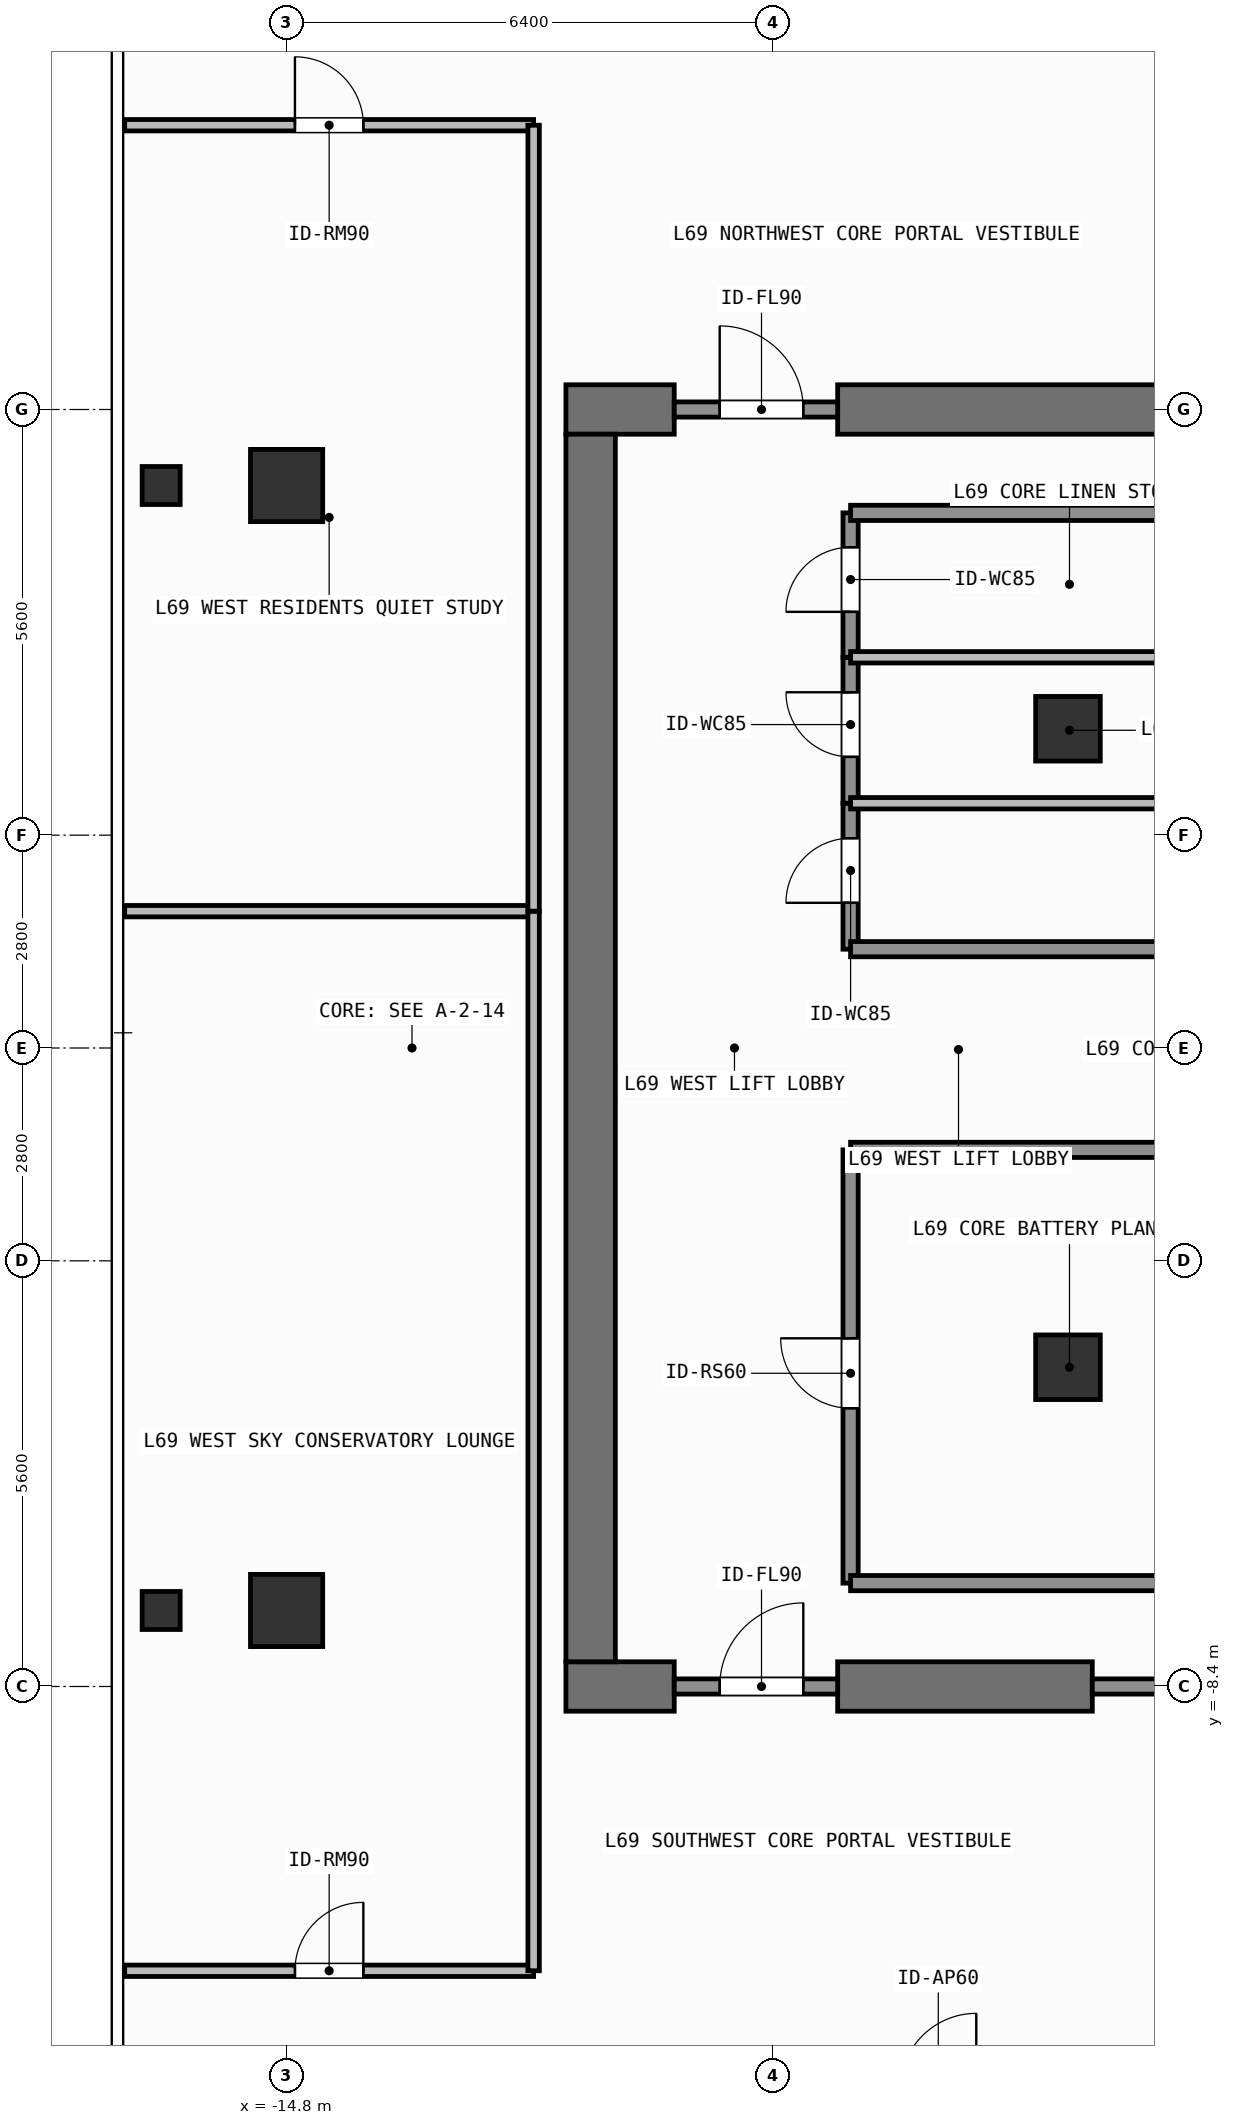
"""IFC4 building model, lengths in metres.
Left out: names, types, materials, properties, quantities, classifications, styles, units other than length and angle.
Written with IfcOpenShell. Run it as: python <this file> out.ifc"""

import sys

from ifc_helpers import new_model, si_unit, direction, frame, frame_2d, origin, origin_2d, place, context, subcontext, project, spatial, rectangle, hollow_rectangle, extrude, element, fill, save


model = new_model("IFC4")
c1 = context("Model", 3, precision=1e-05, world=origin(), true_north=direction((0.0, 1.0)))
c2 = subcontext(c1, "Body", "Model", "MODEL_VIEW")
j1 = project(units=[si_unit("LENGTHUNIT", "METRE"), si_unit("PLANEANGLEUNIT", "RADIAN")], contexts=[c1])
p1 = place(None, origin())
s1 = spatial("IfcSite", under=j1, at=p1, CompositionType="ELEMENT")
p2 = place(p1, origin())
s2 = spatial("IfcBuilding", under=s1, at=p2, CompositionType="ELEMENT")
p3 = place(p2, frame((0.0, 0.0, 282.0)))
s3 = spatial("IfcBuildingStorey", under=s2, at=p3, CompositionType="ELEMENT", Elevation=282.0)
p4 = place(p3, frame((-11.125, -8.4, 0.0), z_axis=(0.0, 0.0, 1.0), x_axis=(1.0, 0.0, 0.0)))
e1 = element("IfcWall", 1, at=p4, inside=s3, PredefinedType="SHEAR", context=c2, shape_type="SweptSolid", body=[
    extrude(rectangle(XDim=1.425, YDim=0.65, at=frame_2d((0.712, 0.0))), origin(), (0.0, 0.0, 1.0), 3.9),
])
p5 = place(p3, frame((-7.55, -8.4, 0.0), z_axis=(0.0, 0.0, 1.0), x_axis=(1.0, 0.0, 0.0)))
e2 = element("IfcWall", 2, at=p5, inside=s3, PredefinedType="SHEAR", context=c2, shape_type="SweptSolid", body=[
    extrude(rectangle(XDim=3.35, YDim=0.65, at=frame_2d((1.675, 0.0))), origin(), (0.0, 0.0, 1.0), 3.9),
])
p6 = place(p3, frame((-11.125, 8.4, 0.0), z_axis=(0.0, 0.0, 1.0), x_axis=(1.0, 0.0, 0.0)))
e3 = element("IfcWall", 3, at=p6, inside=s3, PredefinedType="SHEAR", context=c2, shape_type="SweptSolid", body=[
    extrude(rectangle(XDim=1.425, YDim=0.65, at=frame_2d((0.712, 0.0))), origin(), (0.0, 0.0, 1.0), 3.9),
])
p7 = place(p3, frame((-7.55, 8.4, 0.0), z_axis=(0.0, 0.0, 1.0), x_axis=(1.0, 0.0, 0.0)))
e4 = element("IfcWall", 4, at=p7, inside=s3, PredefinedType="SHEAR", context=c2, shape_type="SweptSolid", body=[
    extrude(rectangle(XDim=16.275, YDim=0.65, at=frame_2d((8.138, 0.0))), origin(), (0.0, 0.0, 1.0), 3.9),
])
p8 = place(p3, frame((-10.8, -8.075, 0.0), z_axis=(0.0, 0.0, 1.0), x_axis=(0.0, 1.0, 0.0)))
e5 = element("IfcWall", 5, at=p8, inside=s3, PredefinedType="SHEAR", context=c2, shape_type="SweptSolid", body=[
    extrude(rectangle(XDim=16.15, YDim=0.65, at=frame_2d((8.075, 0.0))), origin(), (0.0, 0.0, 1.0), 3.9),
])
for number, where, z_axis, x_axis in (
    (6, (-14.8, -7.4, 0.0), (0.0, 0.0, 1.0), (1.0, 0.0, 0.0)),
    (7, (-14.8, 7.4, 0.0), (0.0, 0.0, 1.0), (1.0, 0.0, 0.0)),
):
    element("IfcColumn", number, at=place(p3, frame(where, z_axis=z_axis, x_axis=x_axis)), inside=s3, PredefinedType="COLUMN", context=c2, shape_type="SweptSolid", body=[
        extrude(rectangle(XDim=0.95, YDim=0.95, at=origin_2d()), origin(), (0.0, 0.0, 1.0), 3.9),
    ])
for number, where, z_axis, x_axis in (
    (8, (-4.52, -4.2, 0.0), (0.0, 0.0, 1.0), (1.0, 0.0, 0.0)),
    (9, (-4.52, 4.2, 0.0), (0.0, 0.0, 1.0), (1.0, 0.0, 0.0)),
):
    element("IfcColumn", number, at=place(p3, frame(where, z_axis=z_axis, x_axis=x_axis)), inside=s3, PredefinedType="COLUMN", context=c2, shape_type="SweptSolid", body=[
        extrude(rectangle(XDim=0.85, YDim=0.85, at=origin_2d()), origin(), (0.0, 0.0, 1.0), 3.9),
    ])
for number, where, z_axis, x_axis in (
    (10, (-16.45, -7.4, 0.0), (0.0, 0.0, 1.0), (1.0, 0.0, 0.0)),
    (11, (-16.45, 7.4, 0.0), (0.0, 0.0, 1.0), (1.0, 0.0, 0.0)),
):
    element("IfcColumn", number, at=place(p3, frame(where, z_axis=z_axis, x_axis=x_axis)), inside=s3, PredefinedType="COLUMN", context=c2, shape_type="SweptSolid", body=[
        extrude(hollow_rectangle(XDim=0.5, YDim=0.5, WallThickness=0.025, at=origin_2d()), origin(), (0.0, 0.0, 1.0), 3.9),
    ])
p9 = place(p3, frame((-9.7, -8.4, 0.0), z_axis=(0.0, 0.0, 1.0), x_axis=(1.0, 0.0, 0.0)))
e12 = element("IfcWall", 12, at=p9, inside=s3, PredefinedType="SOLIDWALL", context=c2, shape_type="SweptSolid", body=[
    extrude(rectangle(XDim=2.15, YDim=0.2, at=frame_2d((1.075, 0.0))), origin(), (0.0, 0.0, 1.0), 2.86),
])
p10 = place(p9, frame((0.598, 0.0, 0.0)))
e13 = element("IfcOpeningElement", 13, at=p10, cuts=e12, PredefinedType="OPENING", context=c2, shape_type="SweptSolid", body=[
    extrude(rectangle(XDim=1.1, YDim=2.15, at=frame_2d((0.55, 1.075))), frame((0.0, 0.11, 0.0), z_axis=(0.0, -1.0, 0.0), x_axis=(1.0, 0.0, 0.0)), (0.0, 0.0, 1.0), 0.22),
])
p11 = place(p3, frame((-9.7, 8.4, 0.0), z_axis=(0.0, 0.0, 1.0), x_axis=(1.0, 0.0, 0.0)))
e14 = element("IfcWall", 14, at=p11, inside=s3, PredefinedType="SOLIDWALL", context=c2, shape_type="SweptSolid", body=[
    extrude(rectangle(XDim=2.15, YDim=0.2, at=frame_2d((1.075, 0.0))), origin(), (0.0, 0.0, 1.0), 2.86),
])
p12 = place(p11, frame((0.598, 0.0, 0.0)))
e15 = element("IfcOpeningElement", 15, at=p12, cuts=e14, PredefinedType="OPENING", context=c2, shape_type="SweptSolid", body=[
    extrude(rectangle(XDim=1.1, YDim=2.15, at=frame_2d((0.55, 1.075))), frame((0.0, 0.11, 0.0), z_axis=(0.0, -1.0, 0.0), x_axis=(1.0, 0.0, 0.0)), (0.0, 0.0, 1.0), 0.22),
])
p13 = place(p3, frame((-7.38, -7.04, 0.0), z_axis=(0.0, 0.0, 1.0), x_axis=(0.0, 1.0, 0.0)))
e16 = element("IfcWall", 16, at=p13, inside=s3, PredefinedType="SOLIDWALL", context=c2, shape_type="SweptSolid", body=[
    extrude(rectangle(XDim=5.7, YDim=0.2, at=frame_2d((2.85, 0.0))), origin(), (0.0, 0.0, 1.0), 3.62),
])
p14 = place(p13, frame((2.301, 0.0, 0.0)))
e17 = element("IfcOpeningElement", 17, at=p14, cuts=e16, PredefinedType="OPENING", context=c2, shape_type="SweptSolid", body=[
    extrude(rectangle(XDim=0.92, YDim=2.1, at=frame_2d((0.46, 1.05))), frame((0.0, 0.11, 0.0), z_axis=(0.0, -1.0, 0.0), x_axis=(1.0, 0.0, 0.0)), (0.0, 0.0, 1.0), 0.22),
])
p15 = place(p3, frame((-7.38, 1.3, 0.0), z_axis=(0.0, 0.0, 1.0), x_axis=(0.0, 1.0, 0.0)))
e18 = element("IfcWall", 18, at=p15, inside=s3, PredefinedType="SOLIDWALL", context=c2, shape_type="SweptSolid", body=[
    extrude(rectangle(XDim=1.92, YDim=0.2, at=frame_2d((0.96, 0.0))), origin(), (0.0, 0.0, 1.0), 3.62),
])
p16 = place(p15, frame((0.61, 0.0, 0.0)))
e19 = element("IfcOpeningElement", 19, at=p16, cuts=e18, PredefinedType="OPENING", context=c2, shape_type="SweptSolid", body=[
    extrude(rectangle(XDim=0.85, YDim=2.1, at=frame_2d((0.425, 1.05))), frame((0.0, 0.11, 0.0), z_axis=(0.0, -1.0, 0.0), x_axis=(1.0, 0.0, 0.0)), (0.0, 0.0, 1.0), 0.22),
])
p17 = place(p3, frame((-7.38, 3.22, 0.0), z_axis=(0.0, 0.0, 1.0), x_axis=(0.0, 1.0, 0.0)))
e20 = element("IfcWall", 20, at=p17, inside=s3, PredefinedType="SOLIDWALL", context=c2, shape_type="SweptSolid", body=[
    extrude(rectangle(XDim=1.92, YDim=0.2, at=frame_2d((0.96, 0.0))), origin(), (0.0, 0.0, 1.0), 3.62),
])
p18 = place(p17, frame((0.61, 0.0, 0.0)))
e21 = element("IfcOpeningElement", 21, at=p18, cuts=e20, PredefinedType="OPENING", context=c2, shape_type="SweptSolid", body=[
    extrude(rectangle(XDim=0.85, YDim=2.1, at=frame_2d((0.425, 1.05))), frame((0.0, 0.11, 0.0), z_axis=(0.0, -1.0, 0.0), x_axis=(1.0, 0.0, 0.0)), (0.0, 0.0, 1.0), 0.22),
])
p19 = place(p3, frame((-7.38, 5.14, 0.0), z_axis=(0.0, 0.0, 1.0), x_axis=(0.0, 1.0, 0.0)))
e22 = element("IfcWall", 22, at=p19, inside=s3, PredefinedType="SOLIDWALL", context=c2, shape_type="SweptSolid", body=[
    extrude(rectangle(XDim=1.9, YDim=0.2, at=frame_2d((0.95, 0.0))), origin(), (0.0, 0.0, 1.0), 3.62),
])
p20 = place(p19, frame((0.598, 0.0, 0.0)))
e23 = element("IfcOpeningElement", 23, at=p20, cuts=e22, PredefinedType="OPENING", context=c2, shape_type="SweptSolid", body=[
    extrude(rectangle(XDim=0.85, YDim=2.1, at=frame_2d((0.425, 1.05))), frame((0.0, 0.11, 0.0), z_axis=(0.0, -1.0, 0.0), x_axis=(1.0, 0.0, 0.0)), (0.0, 0.0, 1.0), 0.22),
])
p21 = place(p3, frame((-16.93, -12.14, 0.0), z_axis=(0.0, 0.0, 1.0), x_axis=(1.0, 0.0, 0.0)))
e24 = element("IfcWall", 24, at=p21, inside=s3, PredefinedType="PARTITIONING", context=c2, shape_type="SweptSolid", body=[
    extrude(rectangle(XDim=5.38, YDim=0.15, at=frame_2d((2.69, 0.0))), origin(), (0.0, 0.0, 1.0), 3.62),
])
p22 = place(p21, frame((2.24, 0.0, 0.0)))
e25 = element("IfcOpeningElement", 25, at=p22, cuts=e24, PredefinedType="OPENING", context=c2, shape_type="SweptSolid", body=[
    extrude(rectangle(XDim=0.9, YDim=2.1, at=frame_2d((0.45, 1.05))), frame((0.0, 0.085, 0.0), z_axis=(0.0, -1.0, 0.0), x_axis=(1.0, 0.0, 0.0)), (0.0, 0.0, 1.0), 0.17),
])
p23 = place(p3, frame((-16.93, 12.14, 0.0), z_axis=(0.0, 0.0, 1.0), x_axis=(1.0, 0.0, 0.0)))
e26 = element("IfcWall", 26, at=p23, inside=s3, PredefinedType="PARTITIONING", context=c2, shape_type="SweptSolid", body=[
    extrude(rectangle(XDim=5.38, YDim=0.15, at=frame_2d((2.69, 0.0))), origin(), (0.0, 0.0, 1.0), 3.62),
])
p24 = place(p23, frame((2.24, 0.0, 0.0)))
e27 = element("IfcOpeningElement", 27, at=p24, cuts=e26, PredefinedType="OPENING", context=c2, shape_type="SweptSolid", body=[
    extrude(rectangle(XDim=0.9, YDim=2.1, at=frame_2d((0.45, 1.05))), frame((0.0, 0.085, 0.0), z_axis=(0.0, -1.0, 0.0), x_axis=(1.0, 0.0, 0.0)), (0.0, 0.0, 1.0), 0.17),
])
p25 = place(p3, frame((-4.2, -8.4, 0.0), z_axis=(0.0, 0.0, 1.0), x_axis=(1.0, 0.0, 0.0)))
e28 = element("IfcWall", 28, at=p25, inside=s3, PredefinedType="SOLIDWALL", context=c2, shape_type="SweptSolid", body=[
    extrude(rectangle(XDim=1.58, YDim=0.2, at=frame_2d((0.79, 0.0))), origin(), (0.0, 0.0, 1.0), 2.86),
])
for number, where, z_axis, x_axis in (
    (29, (-7.38, -1.34, 0.0), (0.0, 0.0, 1.0), (1.0, 0.0, 0.0)),
    (30, (-7.38, 1.3, 0.0), (0.0, 0.0, 1.0), (1.0, 0.0, 0.0)),
):
    element("IfcWall", number, at=place(p3, frame(where, z_axis=z_axis, x_axis=x_axis)), inside=s3, PredefinedType="SOLIDWALL", context=c2, shape_type="SweptSolid", body=[
        extrude(rectangle(XDim=6.24, YDim=0.2, at=frame_2d((3.12, 0.0))), origin(), (0.0, 0.0, 1.0), 3.62),
    ])
for number, where, z_axis, x_axis in (
    (31, (-7.38, -7.04, 0.0), (0.0, 0.0, 1.0), (1.0, 0.0, 0.0)),
    (32, (-7.38, 7.04, 0.0), (0.0, 0.0, 1.0), (1.0, 0.0, 0.0)),
):
    element("IfcWall", number, at=place(p3, frame(where, z_axis=z_axis, x_axis=x_axis)), inside=s3, PredefinedType="SOLIDWALL", context=c2, shape_type="SweptSolid", body=[
        extrude(rectangle(XDim=5.8, YDim=0.2, at=frame_2d((2.9, 0.0))), origin(), (0.0, 0.0, 1.0), 3.62),
    ])
for number, where, z_axis, x_axis in (
    (33, (-7.38, 3.22, 0.0), (0.0, 0.0, 1.0), (1.0, 0.0, 0.0)),
    (34, (-7.38, 5.14, 0.0), (0.0, 0.0, 1.0), (1.0, 0.0, 0.0)),
):
    element("IfcWall", number, at=place(p3, frame(where, z_axis=z_axis, x_axis=x_axis)), inside=s3, PredefinedType="PARTITIONING", context=c2, shape_type="SweptSolid", body=[
        extrude(rectangle(XDim=5.8, YDim=0.15, at=frame_2d((2.9, 0.0))), origin(), (0.0, 0.0, 1.0), 3.62),
    ])
p26 = place(p3, frame((-16.93, 1.8, 0.0), z_axis=(0.0, 0.0, 1.0), x_axis=(1.0, 0.0, 0.0)))
e35 = element("IfcWall", 35, at=p26, inside=s3, PredefinedType="PARTITIONING", context=c2, shape_type="SweptSolid", body=[
    extrude(rectangle(XDim=5.38, YDim=0.15, at=frame_2d((2.69, 0.0))), origin(), (0.0, 0.0, 1.0), 3.62),
])
p27 = place(p3, frame((-11.55, -12.14, 0.0), z_axis=(0.0, 0.0, 1.0), x_axis=(0.0, 1.0, 0.0)))
e36 = element("IfcWall", 36, at=p27, inside=s3, PredefinedType="PARTITIONING", context=c2, shape_type="SweptSolid", body=[
    extrude(rectangle(XDim=13.94, YDim=0.15, at=frame_2d((6.97, 0.0))), origin(), (0.0, 0.0, 1.0), 3.62),
])
p28 = place(p3, frame((-11.55, 1.8, 0.0), z_axis=(0.0, 0.0, 1.0), x_axis=(0.0, 1.0, 0.0)))
e37 = element("IfcWall", 37, at=p28, inside=s3, PredefinedType="PARTITIONING", context=c2, shape_type="SweptSolid", body=[
    extrude(rectangle(XDim=10.34, YDim=0.15, at=frame_2d((5.17, 0.0))), origin(), (0.0, 0.0, 1.0), 3.62),
])
p29 = place(p10, origin())
e38 = element("IfcDoor", 38, at=p29, inside=s3, OperationType="SINGLE_SWING_RIGHT", PredefinedType="DOOR", context=c2, shape_type="SweptSolid", body=[
    extrude(rectangle(XDim=1.1, YDim=2.15, at=frame_2d((0.55, 1.075))), frame((0.0, 0.025, 0.0), z_axis=(0.0, -1.0, 0.0), x_axis=(1.0, 0.0, 0.0)), (0.0, 0.0, 1.0), 0.05),
])
fill(e13, e38)
p30 = place(p12, origin())
e39 = element("IfcDoor", 39, at=p30, inside=s3, OperationType="SINGLE_SWING_LEFT", PredefinedType="DOOR", context=c2, shape_type="SweptSolid", body=[
    extrude(rectangle(XDim=1.1, YDim=2.15, at=frame_2d((0.55, 1.075))), frame((0.0, 0.025, 0.0), z_axis=(0.0, -1.0, 0.0), x_axis=(1.0, 0.0, 0.0)), (0.0, 0.0, 1.0), 0.05),
])
fill(e15, e39)
p31 = place(p14, origin())
e40 = element("IfcDoor", 40, at=p31, inside=s3, OperationType="SINGLE_SWING_RIGHT", PredefinedType="DOOR", context=c2, shape_type="SweptSolid", body=[
    extrude(rectangle(XDim=0.92, YDim=2.1, at=frame_2d((0.46, 1.05))), frame((0.0, 0.025, 0.0), z_axis=(0.0, -1.0, 0.0), x_axis=(1.0, 0.0, 0.0)), (0.0, 0.0, 1.0), 0.05),
])
fill(e17, e40)
p32 = place(p16, origin())
e41 = element("IfcDoor", 41, at=p32, inside=s3, OperationType="SINGLE_SWING_LEFT", PredefinedType="DOOR", context=c2, shape_type="SweptSolid", body=[
    extrude(rectangle(XDim=0.85, YDim=2.1, at=frame_2d((0.425, 1.05))), frame((0.0, 0.025, 0.0), z_axis=(0.0, -1.0, 0.0), x_axis=(1.0, 0.0, 0.0)), (0.0, 0.0, 1.0), 0.05),
])
fill(e19, e41)
p33 = place(p18, origin())
e42 = element("IfcDoor", 42, at=p33, inside=s3, OperationType="SINGLE_SWING_RIGHT", PredefinedType="DOOR", context=c2, shape_type="SweptSolid", body=[
    extrude(rectangle(XDim=0.85, YDim=2.1, at=frame_2d((0.425, 1.05))), frame((0.0, 0.025, 0.0), z_axis=(0.0, -1.0, 0.0), x_axis=(1.0, 0.0, 0.0)), (0.0, 0.0, 1.0), 0.05),
])
fill(e21, e42)
p34 = place(p20, origin())
e43 = element("IfcDoor", 43, at=p34, inside=s3, OperationType="SINGLE_SWING_LEFT", PredefinedType="DOOR", context=c2, shape_type="SweptSolid", body=[
    extrude(rectangle(XDim=0.85, YDim=2.1, at=frame_2d((0.425, 1.05))), frame((0.0, 0.025, 0.0), z_axis=(0.0, -1.0, 0.0), x_axis=(1.0, 0.0, 0.0)), (0.0, 0.0, 1.0), 0.05),
])
fill(e23, e43)
p35 = place(p22, origin())
e44 = element("IfcDoor", 44, at=p35, inside=s3, OperationType="SINGLE_SWING_RIGHT", PredefinedType="DOOR", context=c2, shape_type="SweptSolid", body=[
    extrude(rectangle(XDim=0.9, YDim=2.1, at=frame_2d((0.45, 1.05))), frame((0.0, 0.025, 0.0), z_axis=(0.0, -1.0, 0.0), x_axis=(1.0, 0.0, 0.0)), (0.0, 0.0, 1.0), 0.05),
])
fill(e25, e44)
p36 = place(p24, origin())
e45 = element("IfcDoor", 45, at=p36, inside=s3, OperationType="SINGLE_SWING_LEFT", PredefinedType="DOOR", context=c2, shape_type="SweptSolid", body=[
    extrude(rectangle(XDim=0.9, YDim=2.1, at=frame_2d((0.45, 1.05))), frame((0.0, 0.025, 0.0), z_axis=(0.0, -1.0, 0.0), x_axis=(1.0, 0.0, 0.0)), (0.0, 0.0, 1.0), 0.05),
])
fill(e27, e45)
save(model, sys.argv[1])
